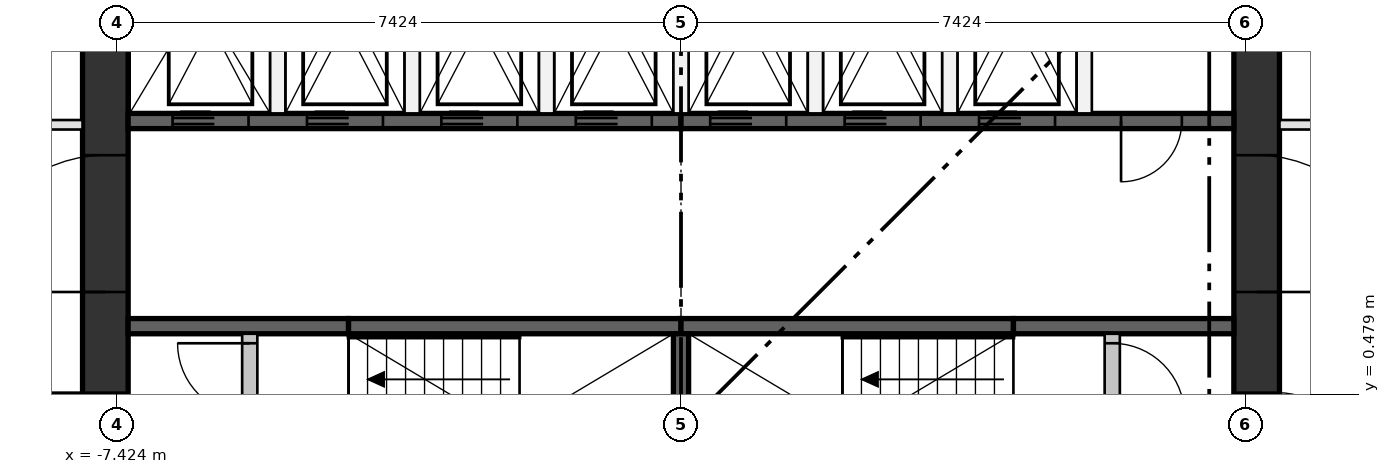
"""IFC4 building model, lengths in metres.
Left out: names, types, materials, properties, quantities, classifications, styles, units other than length and angle.
Written with IfcOpenShell. Run it as: python <this file> out.ifc"""

import sys

from ifc_helpers import new_model, si_unit, direction, frame, frame_2d, origin, place, context, subcontext, project, spatial, rectangle, extrude, element, fill, save


model = new_model("IFC4")
c1 = context("Model", 3, precision=1e-05, world=origin(), true_north=direction((0.0, 1.0)))
c2 = subcontext(c1, "Body", "Model", "MODEL_VIEW")
j1 = project(units=[si_unit("LENGTHUNIT", "METRE"), si_unit("PLANEANGLEUNIT", "RADIAN")], contexts=[c1])
p1 = place(None, origin())
s1 = spatial("IfcSite", under=j1, at=p1, CompositionType="ELEMENT")
p2 = place(p1, origin())
s2 = spatial("IfcBuilding", under=s1, at=p2, CompositionType="ELEMENT")
p3 = place(p2, frame((0.0, 0.0, 157.8)))
s3 = spatial("IfcBuildingStorey", under=s2, at=p3, CompositionType="ELEMENT", Elevation=157.8)
p4 = place(p3, frame((-7.574, -7.274, 0.0), z_axis=(0.0, 0.0, 1.0), x_axis=(0.0, 1.0, 0.0)))
e1 = element("IfcWall", 1, at=p4, inside=s3, PredefinedType="SHEAR", context=c2, shape_type="SweptSolid", body=[
    extrude(rectangle(XDim=14.548, YDim=0.6, at=frame_2d((7.274, 0.0))), origin(), (0.0, 0.0, 1.0), 3.35),
])
p5 = place(p4, frame((6.774, 0.0, 0.0)))
e2 = element("IfcOpeningElement", 2, at=p5, cuts=e1, PredefinedType="OPENING", context=c2, shape_type="SweptSolid", body=[
    extrude(rectangle(XDim=1.0, YDim=2.1, at=frame_2d((0.5, 1.05))), frame((0.0, 0.31, 0.0), z_axis=(0.0, -1.0, 0.0), x_axis=(1.0, 0.0, 0.0)), (0.0, 0.0, 1.0), 0.62),
])
p6 = place(p4, frame((3.649, 0.0, 0.0)))
e3 = element("IfcOpeningElement", 3, at=p6, cuts=e1, PredefinedType="OPENING", context=c2, shape_type="SweptSolid", body=[
    extrude(rectangle(XDim=1.8, YDim=2.1, at=frame_2d((0.9, 1.05))), frame((0.0, 0.31, 0.0), z_axis=(0.0, -1.0, 0.0), x_axis=(1.0, 0.0, 0.0)), (0.0, 0.0, 1.0), 0.62),
])
p7 = place(p4, frame((9.098, 0.0, 0.0)))
e4 = element("IfcOpeningElement", 4, at=p7, cuts=e1, PredefinedType="OPENING", context=c2, shape_type="SweptSolid", body=[
    extrude(rectangle(XDim=1.8, YDim=2.1, at=frame_2d((0.9, 1.05))), frame((0.0, 0.31, 0.0), z_axis=(0.0, -1.0, 0.0), x_axis=(1.0, 0.0, 0.0)), (0.0, 0.0, 1.0), 0.62),
])
p8 = place(p3, frame((7.574, -7.274, 0.0), z_axis=(0.0, 0.0, 1.0), x_axis=(0.0, 1.0, 0.0)))
e5 = element("IfcWall", 5, at=p8, inside=s3, PredefinedType="SHEAR", context=c2, shape_type="SweptSolid", body=[
    extrude(rectangle(XDim=14.548, YDim=0.6, at=frame_2d((7.274, 0.0))), origin(), (0.0, 0.0, 1.0), 3.35),
])
p9 = place(p8, frame((6.774, 0.0, 0.0)))
e6 = element("IfcOpeningElement", 6, at=p9, cuts=e5, PredefinedType="OPENING", context=c2, shape_type="SweptSolid", body=[
    extrude(rectangle(XDim=1.0, YDim=2.1, at=frame_2d((0.5, 1.05))), frame((0.0, 0.31, 0.0), z_axis=(0.0, -1.0, 0.0), x_axis=(1.0, 0.0, 0.0)), (0.0, 0.0, 1.0), 0.62),
])
p10 = place(p8, frame((3.649, 0.0, 0.0)))
e7 = element("IfcOpeningElement", 7, at=p10, cuts=e5, PredefinedType="OPENING", context=c2, shape_type="SweptSolid", body=[
    extrude(rectangle(XDim=1.8, YDim=2.1, at=frame_2d((0.9, 1.05))), frame((0.0, 0.31, 0.0), z_axis=(0.0, -1.0, 0.0), x_axis=(1.0, 0.0, 0.0)), (0.0, 0.0, 1.0), 0.62),
])
p11 = place(p8, frame((9.098, 0.0, 0.0)))
e8 = element("IfcOpeningElement", 8, at=p11, cuts=e5, PredefinedType="OPENING", context=c2, shape_type="SweptSolid", body=[
    extrude(rectangle(XDim=1.8, YDim=2.1, at=frame_2d((0.9, 1.05))), frame((0.0, 0.31, 0.0), z_axis=(0.0, -1.0, 0.0), x_axis=(1.0, 0.0, 0.0)), (0.0, 0.0, 1.0), 0.62),
])
p12 = place(p3, frame((-7.274, 4.074, 0.0), z_axis=(0.0, 0.0, 1.0), x_axis=(1.0, 0.0, 0.0)))
e9 = element("IfcWall", 9, at=p12, inside=s3, PredefinedType="SHEAR", context=c2, shape_type="SweptSolid", body=[
    extrude(rectangle(XDim=7.274, YDim=0.2, at=frame_2d((3.637, 0.0))), origin(), (0.0, 0.0, 1.0), 3.0),
])
p13 = place(p12, frame((0.584, 0.0, 0.0)))
e10 = element("IfcOpeningElement", 10, at=p13, cuts=e9, PredefinedType="OPENING", context=c2, shape_type="SweptSolid", body=[
    extrude(rectangle(XDim=1.0, YDim=2.1, at=frame_2d((0.5, 1.05))), frame((0.0, 0.11, 0.0), z_axis=(0.0, -1.0, 0.0), x_axis=(1.0, 0.0, 0.0)), (0.0, 0.0, 1.0), 0.22),
])
p14 = place(p12, frame((2.353, 0.0, 0.0)))
e11 = element("IfcOpeningElement", 11, at=p14, cuts=e9, PredefinedType="OPENING", context=c2, shape_type="SweptSolid", body=[
    extrude(rectangle(XDim=1.0, YDim=2.1, at=frame_2d((0.5, 1.05))), frame((0.0, 0.11, 0.0), z_axis=(0.0, -1.0, 0.0), x_axis=(1.0, 0.0, 0.0)), (0.0, 0.0, 1.0), 0.22),
])
p15 = place(p12, frame((4.121, 0.0, 0.0)))
e12 = element("IfcOpeningElement", 12, at=p15, cuts=e9, PredefinedType="OPENING", context=c2, shape_type="SweptSolid", body=[
    extrude(rectangle(XDim=1.0, YDim=2.1, at=frame_2d((0.5, 1.05))), frame((0.0, 0.11, 0.0), z_axis=(0.0, -1.0, 0.0), x_axis=(1.0, 0.0, 0.0)), (0.0, 0.0, 1.0), 0.22),
])
p16 = place(p12, frame((5.89, 0.0, 0.0)))
e13 = element("IfcOpeningElement", 13, at=p16, cuts=e9, PredefinedType="OPENING", context=c2, shape_type="SweptSolid", body=[
    extrude(rectangle(XDim=1.0, YDim=2.1, at=frame_2d((0.5, 1.05))), frame((0.0, 0.11, 0.0), z_axis=(0.0, -1.0, 0.0), x_axis=(1.0, 0.0, 0.0)), (0.0, 0.0, 1.0), 0.22),
])
p17 = place(p3, frame((0.0, 4.074, 0.0), z_axis=(0.0, 0.0, 1.0), x_axis=(1.0, 0.0, 0.0)))
e14 = element("IfcWall", 14, at=p17, inside=s3, PredefinedType="SHEAR", context=c2, shape_type="SweptSolid", body=[
    extrude(rectangle(XDim=7.274, YDim=0.2, at=frame_2d((3.637, 0.0))), origin(), (0.0, 0.0, 1.0), 3.0),
])
p18 = place(p17, frame((0.384, 0.0, 0.0)))
e15 = element("IfcOpeningElement", 15, at=p18, cuts=e14, PredefinedType="OPENING", context=c2, shape_type="SweptSolid", body=[
    extrude(rectangle(XDim=1.0, YDim=2.1, at=frame_2d((0.5, 1.05))), frame((0.0, 0.11, 0.0), z_axis=(0.0, -1.0, 0.0), x_axis=(1.0, 0.0, 0.0)), (0.0, 0.0, 1.0), 0.22),
])
p19 = place(p17, frame((2.153, 0.0, 0.0)))
e16 = element("IfcOpeningElement", 16, at=p19, cuts=e14, PredefinedType="OPENING", context=c2, shape_type="SweptSolid", body=[
    extrude(rectangle(XDim=1.0, YDim=2.1, at=frame_2d((0.5, 1.05))), frame((0.0, 0.11, 0.0), z_axis=(0.0, -1.0, 0.0), x_axis=(1.0, 0.0, 0.0)), (0.0, 0.0, 1.0), 0.22),
])
p20 = place(p17, frame((3.921, 0.0, 0.0)))
e17 = element("IfcOpeningElement", 17, at=p20, cuts=e14, PredefinedType="OPENING", context=c2, shape_type="SweptSolid", body=[
    extrude(rectangle(XDim=1.0, YDim=2.1, at=frame_2d((0.5, 1.05))), frame((0.0, 0.11, 0.0), z_axis=(0.0, -1.0, 0.0), x_axis=(1.0, 0.0, 0.0)), (0.0, 0.0, 1.0), 0.22),
])
p21 = place(p17, frame((5.79, 0.0, 0.0)))
e18 = element("IfcOpeningElement", 18, at=p21, cuts=e14, PredefinedType="OPENING", context=c2, shape_type="SweptSolid", body=[
    extrude(rectangle(XDim=0.8, YDim=2.1, at=frame_2d((0.4, 1.05))), frame((0.0, 0.11, 0.0), z_axis=(0.0, -1.0, 0.0), x_axis=(1.0, 0.0, 0.0)), (0.0, 0.0, 1.0), 0.22),
])
p22 = place(p3, frame((-7.274, 1.375, 0.0), z_axis=(0.0, 0.0, 1.0), x_axis=(1.0, 0.0, 0.0)))
e19 = element("IfcWall", 19, at=p22, inside=s3, PredefinedType="SHEAR", context=c2, shape_type="SweptSolid", body=[
    extrude(rectangle(XDim=2.9, YDim=0.2, at=frame_2d((1.45, 0.0))), origin(), (0.0, 0.0, 1.0), 3.0),
])
for number, where, z_axis, x_axis in (
    (20, (-4.374, 1.375, 0.0), (0.0, 0.0, 1.0), (1.0, 0.0, 0.0)),
    (21, (0.0, 1.375, 0.0), (0.0, 0.0, 1.0), (1.0, 0.0, 0.0)),
):
    element("IfcWall", number, at=place(p3, frame(where, z_axis=z_axis, x_axis=x_axis)), inside=s3, PredefinedType="SHEAR", context=c2, shape_type="SweptSolid", body=[
        extrude(rectangle(XDim=4.374, YDim=0.2, at=frame_2d((2.187, 0.0))), origin(), (0.0, 0.0, 1.0), 3.0),
    ])
p23 = place(p3, frame((4.374, 1.375, 0.0), z_axis=(0.0, 0.0, 1.0), x_axis=(1.0, 0.0, 0.0)))
e22 = element("IfcWall", 22, at=p23, inside=s3, PredefinedType="SHEAR", context=c2, shape_type="SweptSolid", body=[
    extrude(rectangle(XDim=2.9, YDim=0.2, at=frame_2d((1.45, 0.0))), origin(), (0.0, 0.0, 1.0), 3.0),
])
p24 = place(p3, frame((0.0, -1.275, 0.0), z_axis=(0.0, 0.0, 1.0), x_axis=(0.0, 1.0, 0.0)))
e23 = element("IfcWall", 23, at=p24, inside=s3, PredefinedType="SHEAR", context=c2, shape_type="SweptSolid", body=[
    extrude(rectangle(XDim=2.55, YDim=0.2, at=frame_2d((1.275, 0.0))), origin(), (0.0, 0.0, 1.0), 3.0),
])
for number, where, z_axis, x_axis in (
    (24, (-5.305, 4.174, 0.0), (0.0, 0.0, 1.0), (0.0, 1.0, 0.0)),
    (25, (-3.537, 4.174, 0.0), (0.0, 0.0, 1.0), (0.0, 1.0, 0.0)),
    (26, (-1.769, 4.174, 0.0), (0.0, 0.0, 1.0), (0.0, 1.0, 0.0)),
    (27, (0.0, 4.174, 0.0), (0.0, 0.0, 1.0), (0.0, 1.0, 0.0)),
    (28, (1.769, 4.174, 0.0), (0.0, 0.0, 1.0), (0.0, 1.0, 0.0)),
    (29, (3.537, 4.174, 0.0), (0.0, 0.0, 1.0), (0.0, 1.0, 0.0)),
    (30, (5.305, 4.174, 0.0), (0.0, 0.0, 1.0), (0.0, 1.0, 0.0)),
):
    element("IfcWall", number, at=place(p3, frame(where, z_axis=z_axis, x_axis=x_axis)), inside=s3, PredefinedType="PARTITIONING", context=c2, shape_type="SweptSolid", body=[
        extrude(rectangle(XDim=3.1, YDim=0.2, at=frame_2d((1.55, 0.0))), origin(), (0.0, 0.0, 1.0), 3.0),
    ])
p25 = place(p3, frame((-5.674, -1.275, 0.0), z_axis=(0.0, 0.0, 1.0), x_axis=(0.0, 1.0, 0.0)))
e31 = element("IfcWall", 31, at=p25, inside=s3, PredefinedType="PARTITIONING", context=c2, shape_type="SweptSolid", body=[
    extrude(rectangle(XDim=2.55, YDim=0.2, at=frame_2d((1.275, 0.0))), origin(), (0.0, 0.0, 1.0), 3.0),
])
p26 = place(p25, frame((0.125, 0.0, 0.0)))
e32 = element("IfcOpeningElement", 32, at=p26, cuts=e31, PredefinedType="OPENING", context=c2, shape_type="SweptSolid", body=[
    extrude(rectangle(XDim=0.95, YDim=2.1, at=frame_2d((0.475, 1.05))), frame((0.0, 0.11, 0.0), z_axis=(0.0, -1.0, 0.0), x_axis=(1.0, 0.0, 0.0)), (0.0, 0.0, 1.0), 0.22),
])
p27 = place(p25, frame((1.475, 0.0, 0.0)))
e33 = element("IfcOpeningElement", 33, at=p27, cuts=e31, PredefinedType="OPENING", context=c2, shape_type="SweptSolid", body=[
    extrude(rectangle(XDim=0.95, YDim=2.1, at=frame_2d((0.475, 1.05))), frame((0.0, 0.11, 0.0), z_axis=(0.0, -1.0, 0.0), x_axis=(1.0, 0.0, 0.0)), (0.0, 0.0, 1.0), 0.22),
])
p28 = place(p3, frame((5.674, -1.275, 0.0), z_axis=(0.0, 0.0, 1.0), x_axis=(0.0, 1.0, 0.0)))
e34 = element("IfcWall", 34, at=p28, inside=s3, PredefinedType="PARTITIONING", context=c2, shape_type="SweptSolid", body=[
    extrude(rectangle(XDim=2.55, YDim=0.2, at=frame_2d((1.275, 0.0))), origin(), (0.0, 0.0, 1.0), 3.0),
])
p29 = place(p28, frame((0.125, 0.0, 0.0)))
e35 = element("IfcOpeningElement", 35, at=p29, cuts=e34, PredefinedType="OPENING", context=c2, shape_type="SweptSolid", body=[
    extrude(rectangle(XDim=0.95, YDim=2.1, at=frame_2d((0.475, 1.05))), frame((0.0, 0.11, 0.0), z_axis=(0.0, -1.0, 0.0), x_axis=(1.0, 0.0, 0.0)), (0.0, 0.0, 1.0), 0.22),
])
p30 = place(p28, frame((1.475, 0.0, 0.0)))
e36 = element("IfcOpeningElement", 36, at=p30, cuts=e34, PredefinedType="OPENING", context=c2, shape_type="SweptSolid", body=[
    extrude(rectangle(XDim=0.95, YDim=2.1, at=frame_2d((0.475, 1.05))), frame((0.0, 0.11, 0.0), z_axis=(0.0, -1.0, 0.0), x_axis=(1.0, 0.0, 0.0)), (0.0, 0.0, 1.0), 0.22),
])
p31 = place(p3, frame((7.874, 4.024, 0.0), z_axis=(0.0, 0.0, 1.0), x_axis=(1.0, 0.0, 0.0)))
e37 = element("IfcWall", 37, at=p31, inside=s3, PredefinedType="PARTITIONING", context=c2, shape_type="SweptSolid", body=[
    extrude(rectangle(XDim=5.036, YDim=0.125, at=frame_2d((2.518, 0.0))), origin(), (0.0, 0.0, 1.0), 3.0),
])
p32 = place(p31, frame((2.0, 0.0, 0.0)))
e38 = element("IfcOpeningElement", 38, at=p32, cuts=e37, PredefinedType="OPENING", context=c2, shape_type="SweptSolid", body=[
    extrude(rectangle(XDim=1.0, YDim=2.1, at=frame_2d((0.5, 1.05))), frame((0.0, 0.073, 0.0), z_axis=(0.0, -1.0, 0.0), x_axis=(1.0, 0.0, 0.0)), (0.0, 0.0, 1.0), 0.145),
])
p33 = place(p3, frame((-11.645, 4.024, 0.0), z_axis=(0.0, 0.0, 1.0), x_axis=(1.0, 0.0, 0.0)))
e39 = element("IfcWall", 39, at=p33, inside=s3, PredefinedType="PARTITIONING", context=c2, shape_type="SweptSolid", body=[
    extrude(rectangle(XDim=3.771, YDim=0.125, at=frame_2d((1.886, 0.0))), origin(), (0.0, 0.0, 1.0), 3.0),
])
p34 = place(p33, frame((1.4, 0.0, 0.0)))
e40 = element("IfcOpeningElement", 40, at=p34, cuts=e39, PredefinedType="OPENING", context=c2, shape_type="SweptSolid", body=[
    extrude(rectangle(XDim=1.0, YDim=2.1, at=frame_2d((0.5, 1.05))), frame((0.0, 0.073, 0.0), z_axis=(0.0, -1.0, 0.0), x_axis=(1.0, 0.0, 0.0)), (0.0, 0.0, 1.0), 0.145),
])
p35 = place(p13, frame((1.0, 0.0, 0.0), z_axis=(0.0, 0.0, 1.0), x_axis=(-1.0, 0.0, 0.0)))
e41 = element("IfcDoor", 41, at=p35, inside=s3, OperationType="DOUBLE_DOOR_SLIDING", PredefinedType="DOOR", context=c2, shape_type="SweptSolid", body=[
    extrude(rectangle(XDim=1.0, YDim=2.1, at=frame_2d((0.5, 1.05))), frame((0.0, 0.025, 0.0), z_axis=(0.0, -1.0, 0.0), x_axis=(1.0, 0.0, 0.0)), (0.0, 0.0, 1.0), 0.05),
])
fill(e10, e41)
p36 = place(p14, frame((1.0, 0.0, 0.0), z_axis=(0.0, 0.0, 1.0), x_axis=(-1.0, 0.0, 0.0)))
e42 = element("IfcDoor", 42, at=p36, inside=s3, OperationType="DOUBLE_DOOR_SLIDING", PredefinedType="DOOR", context=c2, shape_type="SweptSolid", body=[
    extrude(rectangle(XDim=1.0, YDim=2.1, at=frame_2d((0.5, 1.05))), frame((0.0, 0.025, 0.0), z_axis=(0.0, -1.0, 0.0), x_axis=(1.0, 0.0, 0.0)), (0.0, 0.0, 1.0), 0.05),
])
fill(e11, e42)
p37 = place(p15, frame((1.0, 0.0, 0.0), z_axis=(0.0, 0.0, 1.0), x_axis=(-1.0, 0.0, 0.0)))
e43 = element("IfcDoor", 43, at=p37, inside=s3, OperationType="DOUBLE_DOOR_SLIDING", PredefinedType="DOOR", context=c2, shape_type="SweptSolid", body=[
    extrude(rectangle(XDim=1.0, YDim=2.1, at=frame_2d((0.5, 1.05))), frame((0.0, 0.025, 0.0), z_axis=(0.0, -1.0, 0.0), x_axis=(1.0, 0.0, 0.0)), (0.0, 0.0, 1.0), 0.05),
])
fill(e12, e43)
p38 = place(p16, frame((1.0, 0.0, 0.0), z_axis=(0.0, 0.0, 1.0), x_axis=(-1.0, 0.0, 0.0)))
e44 = element("IfcDoor", 44, at=p38, inside=s3, OperationType="DOUBLE_DOOR_SLIDING", PredefinedType="DOOR", context=c2, shape_type="SweptSolid", body=[
    extrude(rectangle(XDim=1.0, YDim=2.1, at=frame_2d((0.5, 1.05))), frame((0.0, 0.025, 0.0), z_axis=(0.0, -1.0, 0.0), x_axis=(1.0, 0.0, 0.0)), (0.0, 0.0, 1.0), 0.05),
])
fill(e13, e44)
p39 = place(p18, frame((1.0, 0.0, 0.0), z_axis=(0.0, 0.0, 1.0), x_axis=(-1.0, 0.0, 0.0)))
e45 = element("IfcDoor", 45, at=p39, inside=s3, OperationType="DOUBLE_DOOR_SLIDING", PredefinedType="DOOR", context=c2, shape_type="SweptSolid", body=[
    extrude(rectangle(XDim=1.0, YDim=2.1, at=frame_2d((0.5, 1.05))), frame((0.0, 0.025, 0.0), z_axis=(0.0, -1.0, 0.0), x_axis=(1.0, 0.0, 0.0)), (0.0, 0.0, 1.0), 0.05),
])
fill(e15, e45)
p40 = place(p19, frame((1.0, 0.0, 0.0), z_axis=(0.0, 0.0, 1.0), x_axis=(-1.0, 0.0, 0.0)))
e46 = element("IfcDoor", 46, at=p40, inside=s3, OperationType="DOUBLE_DOOR_SLIDING", PredefinedType="DOOR", context=c2, shape_type="SweptSolid", body=[
    extrude(rectangle(XDim=1.0, YDim=2.1, at=frame_2d((0.5, 1.05))), frame((0.0, 0.025, 0.0), z_axis=(0.0, -1.0, 0.0), x_axis=(1.0, 0.0, 0.0)), (0.0, 0.0, 1.0), 0.05),
])
fill(e16, e46)
p41 = place(p20, frame((1.0, 0.0, 0.0), z_axis=(0.0, 0.0, 1.0), x_axis=(-1.0, 0.0, 0.0)))
e47 = element("IfcDoor", 47, at=p41, inside=s3, OperationType="DOUBLE_DOOR_SLIDING", PredefinedType="DOOR", context=c2, shape_type="SweptSolid", body=[
    extrude(rectangle(XDim=1.0, YDim=2.1, at=frame_2d((0.5, 1.05))), frame((0.0, 0.025, 0.0), z_axis=(0.0, -1.0, 0.0), x_axis=(1.0, 0.0, 0.0)), (0.0, 0.0, 1.0), 0.05),
])
fill(e17, e47)
p42 = place(p27, origin())
e48 = element("IfcDoor", 48, at=p42, inside=s3, OperationType="SINGLE_SWING_RIGHT", PredefinedType="DOOR", context=c2, shape_type="SweptSolid", body=[
    extrude(rectangle(XDim=0.95, YDim=2.1, at=frame_2d((0.475, 1.05))), frame((0.0, 0.025, 0.0), z_axis=(0.0, -1.0, 0.0), x_axis=(1.0, 0.0, 0.0)), (0.0, 0.0, 1.0), 0.05),
])
fill(e33, e48)
p43 = place(p30, frame((0.95, 0.0, 0.0), z_axis=(0.0, 0.0, 1.0), x_axis=(-1.0, 0.0, 0.0)))
e49 = element("IfcDoor", 49, at=p43, inside=s3, OperationType="SINGLE_SWING_LEFT", PredefinedType="DOOR", context=c2, shape_type="SweptSolid", body=[
    extrude(rectangle(XDim=0.95, YDim=2.1, at=frame_2d((0.475, 1.05))), frame((0.0, 0.025, 0.0), z_axis=(0.0, -1.0, 0.0), x_axis=(1.0, 0.0, 0.0)), (0.0, 0.0, 1.0), 0.05),
])
fill(e36, e49)
p44 = place(p21, frame((0.8, 0.0, 0.0), z_axis=(0.0, 0.0, 1.0), x_axis=(-1.0, 0.0, 0.0)))
e50 = element("IfcDoor", 50, at=p44, inside=s3, OperationType="SINGLE_SWING_LEFT", PredefinedType="DOOR", context=c2, shape_type="SweptSolid", body=[
    extrude(rectangle(XDim=0.8, YDim=2.1, at=frame_2d((0.4, 1.05))), frame((0.0, 0.025, 0.0), z_axis=(0.0, -1.0, 0.0), x_axis=(1.0, 0.0, 0.0)), (0.0, 0.0, 1.0), 0.05),
])
fill(e18, e50)
p45 = place(p5, origin())
e51 = element("IfcDoor", 51, at=p45, inside=s3, OperationType="SINGLE_SWING_RIGHT", PredefinedType="DOOR", context=c2, shape_type="SweptSolid", body=[
    extrude(rectangle(XDim=1.0, YDim=2.1, at=frame_2d((0.5, 1.05))), frame((0.0, 0.3, 0.0), z_axis=(0.0, -1.0, 0.0), x_axis=(1.0, 0.0, 0.0)), (0.0, 0.0, 1.0), 0.05),
])
fill(e2, e51)
p46 = place(p7, origin())
e52 = element("IfcDoor", 52, at=p46, inside=s3, OperationType="DOUBLE_DOOR_SINGLE_SWING", PredefinedType="DOOR", context=c2, shape_type="SweptSolid", body=[
    extrude(rectangle(XDim=1.8, YDim=2.1, at=frame_2d((0.9, 1.05))), frame((0.0, 0.025, 0.0), z_axis=(0.0, -1.0, 0.0), x_axis=(1.0, 0.0, 0.0)), (0.0, 0.0, 1.0), 0.05),
])
fill(e4, e52)
p47 = place(p9, frame((1.0, 0.0, 0.0), z_axis=(0.0, 0.0, 1.0), x_axis=(-1.0, 0.0, 0.0)))
e53 = element("IfcDoor", 53, at=p47, inside=s3, OperationType="SINGLE_SWING_LEFT", PredefinedType="DOOR", context=c2, shape_type="SweptSolid", body=[
    extrude(rectangle(XDim=1.0, YDim=2.1, at=frame_2d((0.5, 1.05))), frame((0.0, 0.3, 0.0), z_axis=(0.0, -1.0, 0.0), x_axis=(1.0, 0.0, 0.0)), (0.0, 0.0, 1.0), 0.05),
])
fill(e6, e53)
p48 = place(p11, frame((1.8, 0.0, 0.0), z_axis=(0.0, 0.0, 1.0), x_axis=(-1.0, 0.0, 0.0)))
e54 = element("IfcDoor", 54, at=p48, inside=s3, OperationType="DOUBLE_DOOR_SINGLE_SWING", PredefinedType="DOOR", context=c2, shape_type="SweptSolid", body=[
    extrude(rectangle(XDim=1.8, YDim=2.1, at=frame_2d((0.9, 1.05))), frame((0.0, 0.025, 0.0), z_axis=(0.0, -1.0, 0.0), x_axis=(1.0, 0.0, 0.0)), (0.0, 0.0, 1.0), 0.05),
])
fill(e8, e54)
save(model, sys.argv[1])
